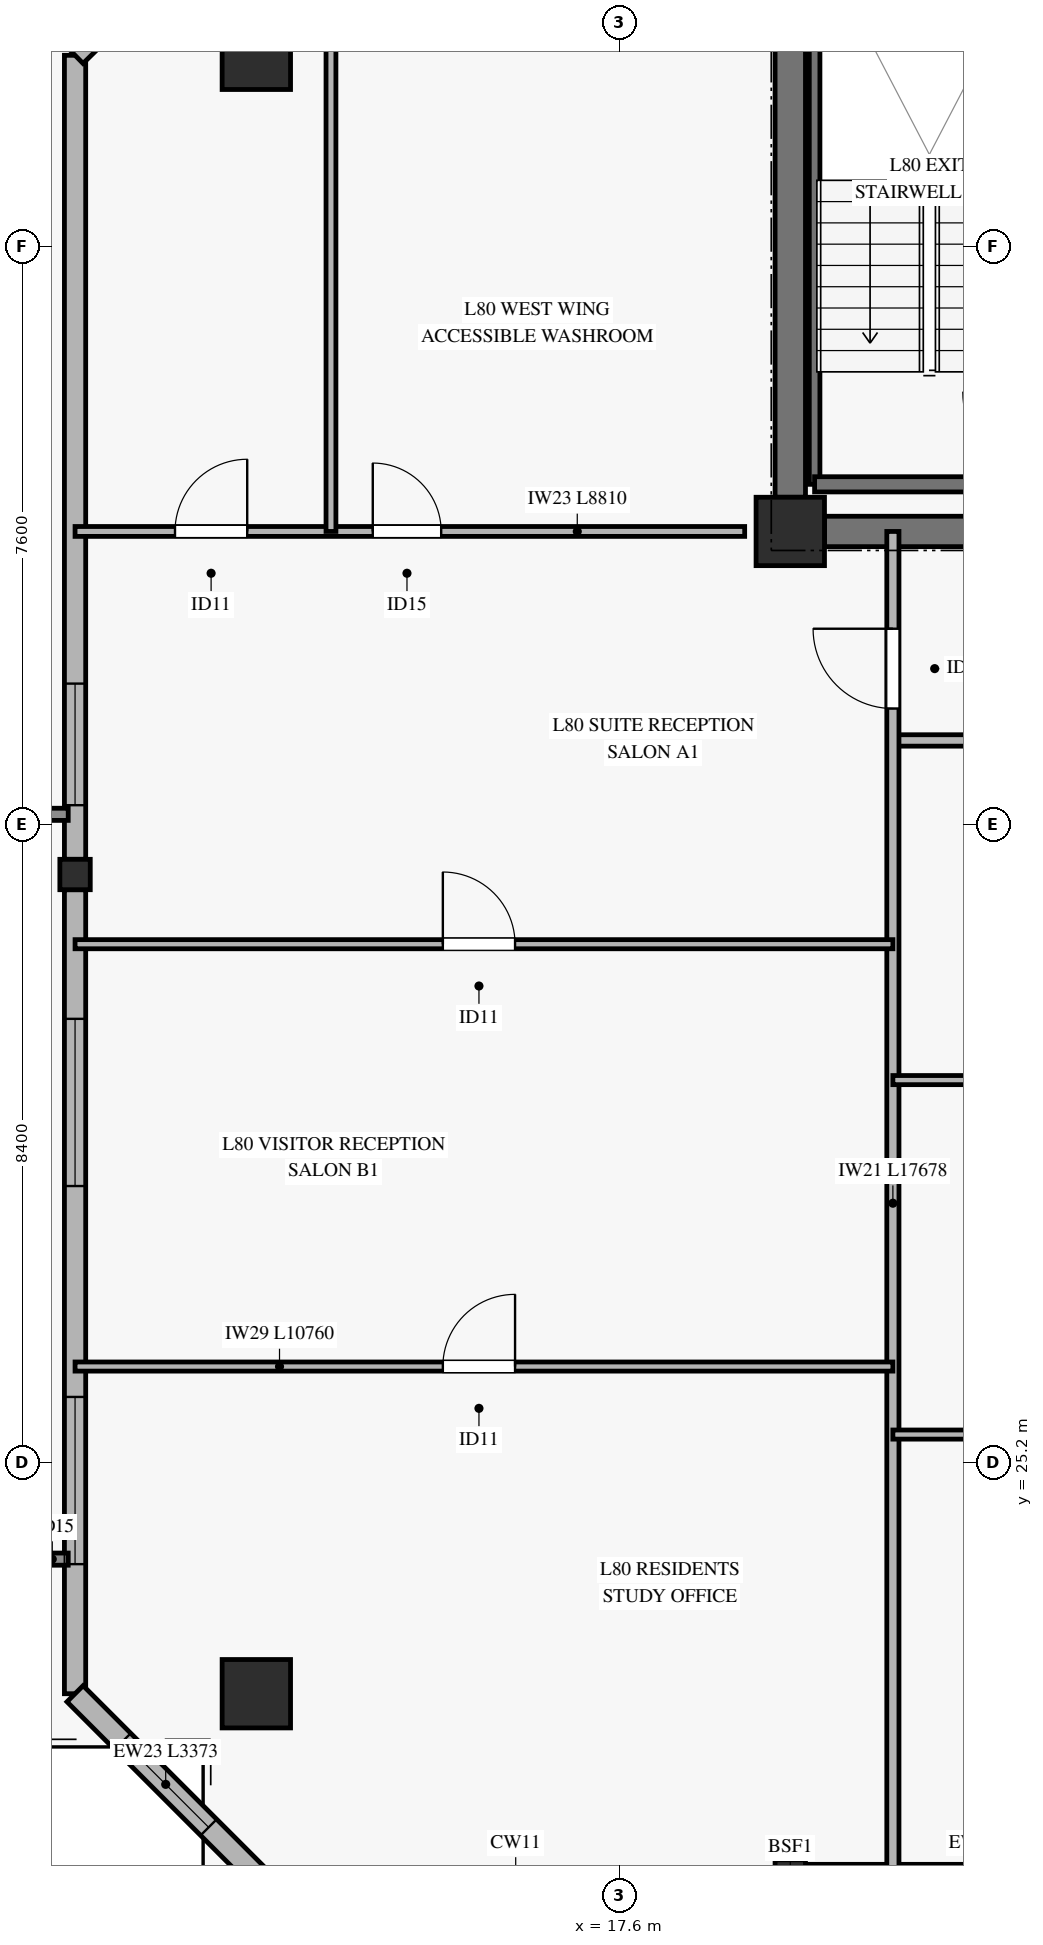
"""IFC4 building model, lengths in metres.
Left out: names, types, materials, properties, quantities, classifications, styles, units other than length and angle.
Written with IfcOpenShell. Run it as: python <this file> out.ifc"""

import sys

from ifc_helpers import new_model, si_unit, direction, frame, frame_2d, origin, origin_2d, place, context, subcontext, project, spatial, rectangle, hollow_rectangle, extrude, source, transform, mapped, element, fill, save


model = new_model("IFC4")
c1 = context("Model", 3, precision=1e-05, world=origin(), true_north=direction((0.0, 1.0)))
c2 = subcontext(c1, "Body", "Model", "MODEL_VIEW")
j1 = project(units=[si_unit("LENGTHUNIT", "METRE"), si_unit("PLANEANGLEUNIT", "RADIAN")], contexts=[c1])
p1 = place(None, origin())
s1 = spatial("IfcSite", under=j1, at=p1, CompositionType="ELEMENT")
p2 = place(p1, origin())
s2 = spatial("IfcBuilding", under=s1, at=p2, CompositionType="ELEMENT")
p3 = place(p2, frame((0.0, 0.0, 310.8)))
s3 = spatial("IfcBuildingStorey", under=s2, at=p3, CompositionType="ELEMENT", Elevation=310.8)
m1 = source(origin(), c2, "Body", "SweptSolid", [
    extrude(rectangle(XDim=0.9, YDim=0.9, at=origin_2d()), origin(), (0.0, 0.0, 1.0), 3.185),
])
p4 = place(p3, frame((19.85, 37.45, 0.0), z_axis=(0.0, 0.0, 1.0), x_axis=(1.0, 0.0, 0.0)))
e1 = element("IfcColumn", 1, at=p4, inside=s3, PredefinedType="PILASTER", context=c2, shape_type="MappedRepresentation", body=[
    mapped(m1, transform((0.0, 0.0, 0.0), x_axis=(1.0, 0.0, 0.0), y_axis=(0.0, 1.0, 0.0), z_axis=(0.0, 0.0, 1.0), scale=1.0)),
])
p5 = place(p3, frame((20.3, 37.45, 0.0), z_axis=(0.0, 0.0, 1.0), x_axis=(1.0, 0.0, 0.0)))
e2 = element("IfcWall", 2, at=p5, inside=s3, PredefinedType="SHEAR", context=c2, shape_type="SweptSolid", body=[
    extrude(rectangle(XDim=10.05, YDim=0.4, at=frame_2d((5.025, 0.0))), origin(), (0.0, 0.0, 1.0), 3.185),
])
p6 = place(p5, frame((4.25, 0.0, 0.0)))
e3 = element("IfcOpeningElement", 3, at=p6, cuts=e2, PredefinedType="OPENING", context=c2, shape_type="SweptSolid", body=[
    extrude(rectangle(XDim=1.2, YDim=2.15, at=frame_2d((0.6, 1.075))), frame((0.0, 0.21, 0.0), z_axis=(0.0, -1.0, 0.0), x_axis=(1.0, 0.0, 0.0)), (0.0, 0.0, 1.0), 0.42),
])
p7 = place(p3, frame((19.85, 37.9, 0.0), z_axis=(0.0, 0.0, 1.0), x_axis=(0.0, 1.0, 0.0)))
e4 = element("IfcWall", 4, at=p7, inside=s3, PredefinedType="SHEAR", context=c2, shape_type="SweptSolid", body=[
    extrude(rectangle(XDim=8.2, YDim=0.4, at=frame_2d((4.1, 0.0))), origin(), (0.0, 0.0, 1.0), 3.185),
])
m2 = source(origin(), c2, "Body", "SweptSolid", [
    extrude(hollow_rectangle(XDim=0.9, YDim=0.9, WallThickness=0.04, at=origin_2d()), origin(), (0.0, 0.0, 1.0), 3.326),
])
p8 = place(p3, frame((12.825, 22.157, 0.0), z_axis=(0.110687193154, 0.266074983542, 0.957576340771), x_axis=(-0.923295305511, 0.384090847093, 0.0)))
e5 = element("IfcColumn", 5, at=p8, inside=s3, PredefinedType="COLUMN", context=c2, shape_type="MappedRepresentation", body=[
    mapped(m2, transform((0.0, 0.0, 0.0), x_axis=(1.0, 0.0, 0.0), y_axis=(0.0, 1.0, 0.0), z_axis=(0.0, 0.0, 1.0), scale=1.0)),
])
m3 = source(origin(), c2, "Body", "SweptSolid", [
    extrude(hollow_rectangle(XDim=0.9, YDim=0.9, WallThickness=0.04, at=origin_2d()), origin(), (0.0, 0.0, 1.0), 3.207),
])
p9 = place(p3, frame((12.825, 43.715, 0.0), z_axis=(0.114814147979, 0.014618246958, 0.993279426083), x_axis=(-0.126301358356, 0.991991918756, 0.0)))
e6 = element("IfcColumn", 6, at=p9, inside=s3, PredefinedType="COLUMN", context=c2, shape_type="MappedRepresentation", body=[
    mapped(m3, transform((0.0, 0.0, 0.0), x_axis=(1.0, 0.0, 0.0), y_axis=(0.0, 1.0, 0.0), z_axis=(0.0, 0.0, 1.0), scale=1.0)),
])
m4 = source(origin(), c2, "Body", "SweptSolid", [
    extrude(hollow_rectangle(XDim=0.4, YDim=0.4, WallThickness=0.02, at=origin_2d()), origin(), (0.0, 0.0, 1.0), 3.319),
])
p10 = place(p3, frame((19.85, 19.772, 0.0), z_axis=(0.0, 0.280875615119, 0.959744178847), x_axis=(-1.0, 0.0, 0.0)))
e7 = element("IfcColumn", 7, at=p10, inside=s3, PredefinedType="COLUMN", context=c2, shape_type="MappedRepresentation", body=[
    mapped(m4, transform((0.0, 0.0, 0.0), x_axis=(1.0, 0.0, 0.0), y_axis=(0.0, 1.0, 0.0), z_axis=(0.0, 0.0, 1.0), scale=1.0)),
])
m5 = source(origin(), c2, "Body", "SweptSolid", [
    extrude(hollow_rectangle(XDim=0.4, YDim=0.4, WallThickness=0.02, at=origin_2d()), origin(), (0.0, 0.0, 1.0), 3.246),
])
p11 = place(p3, frame((10.44, 32.936, 0.0), z_axis=(0.127876528395, 0.143597819239, 0.981339523201), x_axis=(-0.746804669772, 0.665043446104, 0.0)))
e8 = element("IfcColumn", 8, at=p11, inside=s3, PredefinedType="COLUMN", context=c2, shape_type="MappedRepresentation", body=[
    mapped(m5, transform((0.0, 0.0, 0.0), x_axis=(1.0, 0.0, 0.0), y_axis=(0.0, 1.0, 0.0), z_axis=(0.0, 0.0, 1.0), scale=1.0)),
])
p12 = place(p3, frame((20.05, 19.772, 0.0), z_axis=(0.0, 0.0, 1.0), x_axis=(1.0, 0.0, 0.0)))
e9 = element("IfcWall", 9, at=p12, inside=s3, PredefinedType="SOLIDWALL", context=c2, shape_type="SweptSolid", body=[
    extrude(rectangle(XDim=10.55, YDim=0.28, at=frame_2d((5.275, 0.0))), origin(), (0.0, 0.0, 1.0), 2.815),
])
p13 = place(p12, frame((4.35, 0.0, 0.0)))
e10 = element("IfcOpeningElement", 10, at=p13, cuts=e9, PredefinedType="OPENING", context=c2, shape_type="SweptSolid", body=[
    extrude(rectangle(XDim=1.8, YDim=2.25, at=frame_2d((0.9, 1.125))), frame((0.0, 0.15, 0.0), z_axis=(0.0, -1.0, 0.0), x_axis=(1.0, 0.0, 0.0)), (0.0, 0.0, 1.0), 0.3),
])
p14 = place(p12, frame((1.57, 0.0, 0.45)))
e11 = element("IfcOpeningElement", 11, at=p14, cuts=e9, PredefinedType="OPENING", context=c2, shape_type="SweptSolid", body=[
    extrude(rectangle(XDim=2.2, YDim=2.1, at=frame_2d((1.1, 1.05))), frame((0.0, 0.15, 0.0), z_axis=(0.0, -1.0, 0.0), x_axis=(1.0, 0.0, 0.0)), (0.0, 0.0, 1.0), 0.3),
])
p15 = place(p12, frame((7.35, 0.0, 0.45)))
e12 = element("IfcOpeningElement", 12, at=p15, cuts=e9, PredefinedType="OPENING", context=c2, shape_type="SweptSolid", body=[
    extrude(rectangle(XDim=1.6, YDim=2.0, at=frame_2d((0.8, 1.0))), frame((0.0, 0.15, 0.0), z_axis=(0.0, -1.0, 0.0), x_axis=(1.0, 0.0, 0.0)), (0.0, 0.0, 1.0), 0.3),
])
p16 = place(p3, frame((10.44, 22.157, 0.0), z_axis=(0.0, 0.0, 1.0), x_axis=(0.0, 1.0, 0.0)))
e13 = element("IfcWall", 13, at=p16, inside=s3, PredefinedType="SOLIDWALL", context=c2, shape_type="SweptSolid", body=[
    extrude(rectangle(XDim=10.579, YDim=0.28, at=frame_2d((5.29, 0.0))), origin(), (0.0, 0.0, 1.0), 2.815),
])
p17 = place(p16, frame((1.705, 0.0, 0.45)))
e14 = element("IfcOpeningElement", 14, at=p17, cuts=e13, PredefinedType="OPENING", context=c2, shape_type="SweptSolid", body=[
    extrude(rectangle(XDim=2.2, YDim=2.1, at=frame_2d((1.1, 1.05))), frame((0.0, 0.15, 0.0), z_axis=(0.0, -1.0, 0.0), x_axis=(1.0, 0.0, 0.0)), (0.0, 0.0, 1.0), 0.3),
])
p18 = place(p16, frame((6.68, 0.0, 0.45)))
e15 = element("IfcOpeningElement", 15, at=p18, cuts=e13, PredefinedType="OPENING", context=c2, shape_type="SweptSolid", body=[
    extrude(rectangle(XDim=2.2, YDim=2.1, at=frame_2d((1.1, 1.05))), frame((0.0, 0.15, 0.0), z_axis=(0.0, -1.0, 0.0), x_axis=(1.0, 0.0, 0.0)), (0.0, 0.0, 1.0), 0.3),
])
p19 = place(p3, frame((10.44, 33.136, 0.0), z_axis=(0.0, 0.0, 1.0), x_axis=(0.0, 1.0, 0.0)))
e16 = element("IfcWall", 16, at=p19, inside=s3, PredefinedType="SOLIDWALL", context=c2, shape_type="SweptSolid", body=[
    extrude(rectangle(XDim=10.579, YDim=0.28, at=frame_2d((5.29, 0.0))), origin(), (0.0, 0.0, 1.0), 2.815),
])
p20 = place(p19, frame((0.712, 0.0, 0.45)))
e17 = element("IfcOpeningElement", 17, at=p20, cuts=e16, PredefinedType="OPENING", context=c2, shape_type="SweptSolid", body=[
    extrude(rectangle(XDim=1.6, YDim=2.0, at=frame_2d((0.8, 1.0))), frame((0.0, 0.15, 0.0), z_axis=(0.0, -1.0, 0.0), x_axis=(1.0, 0.0, 0.0)), (0.0, 0.0, 1.0), 0.3),
])
p21 = place(p3, frame((10.44, 22.157, 0.0), z_axis=(0.0, 0.0, 1.0), x_axis=(0.707106781187, -0.707106781187, 0.0)))
e18 = element("IfcWall", 18, at=p21, inside=s3, PredefinedType="SOLIDWALL", context=c2, shape_type="SweptSolid", body=[
    extrude(rectangle(XDim=3.373, YDim=0.3, at=frame_2d((1.687, 0.0))), origin(), (0.0, 0.0, 1.0), 2.815),
])
p22 = place(p21, frame((0.886, 0.0, 0.45)))
e19 = element("IfcOpeningElement", 19, at=p22, cuts=e18, PredefinedType="OPENING", context=c2, shape_type="SweptSolid", body=[
    extrude(rectangle(XDim=1.6, YDim=2.0, at=frame_2d((0.8, 1.0))), frame((0.0, 0.16, 0.0), z_axis=(0.0, -1.0, 0.0), x_axis=(1.0, 0.0, 0.0)), (0.0, 0.0, 1.0), 0.32),
])
p23 = place(p3, frame((13.025, 46.25, 0.0), z_axis=(0.0, 0.0, 1.0), x_axis=(-0.713984922877, -0.700161074257, 0.0)))
e20 = element("IfcWall", 20, at=p23, inside=s3, PredefinedType="SOLIDWALL", context=c2, shape_type="SweptSolid", body=[
    extrude(rectangle(XDim=3.62, YDim=0.3, at=frame_2d((1.81, 0.0))), origin(), (0.0, 0.0, 1.0), 2.815),
])
p24 = place(p23, frame((1.01, 0.0, 0.45)))
e21 = element("IfcOpeningElement", 21, at=p24, cuts=e20, PredefinedType="OPENING", context=c2, shape_type="SweptSolid", body=[
    extrude(rectangle(XDim=1.6, YDim=2.0, at=frame_2d((0.8, 1.0))), frame((0.0, 0.16, 0.0), z_axis=(0.0, -1.0, 0.0), x_axis=(1.0, 0.0, 0.0)), (0.0, 0.0, 1.0), 0.32),
])
p25 = place(p3, frame((20.17, 38.07, 0.0), z_axis=(0.0, 0.0, 1.0), x_axis=(0.0, 1.0, 0.0)))
e22 = element("IfcWall", 22, at=p25, inside=s3, PredefinedType="SOLIDWALL", context=c2, shape_type="SweptSolid", body=[
    extrude(rectangle(XDim=7.25, YDim=0.14, at=frame_2d((3.625, 0.0))), origin(), (0.0, 0.0, 1.0), 3.4),
])
p26 = place(p3, frame((20.17, 38.07, 0.0), z_axis=(0.0, 0.0, 1.0), x_axis=(1.0, 0.0, 0.0)))
e23 = element("IfcWall", 23, at=p26, inside=s3, PredefinedType="SOLIDWALL", context=c2, shape_type="SweptSolid", body=[
    extrude(rectangle(XDim=3.05, YDim=0.2, at=frame_2d((1.525, 0.0))), origin(), (0.0, 0.0, 1.0), 3.4),
])
p27 = place(p3, frame((21.2, 34.7, 0.0), z_axis=(0.0, 0.0, 1.0), x_axis=(1.0, 0.0, 0.0)))
e24 = element("IfcWall", 24, at=p27, inside=s3, PredefinedType="PARTITIONING", context=c2, shape_type="SweptSolid", body=[
    extrude(rectangle(XDim=23.1, YDim=0.15, at=frame_2d((11.55, 0.0))), origin(), (0.0, 0.0, 1.0), 2.47),
])
p28 = place(p27, frame((5.185, 0.0, 0.0)))
e25 = element("IfcOpeningElement", 25, at=p28, cuts=e24, PredefinedType="OPENING", context=c2, shape_type="SweptSolid", body=[
    extrude(rectangle(XDim=1.05, YDim=2.15, at=frame_2d((0.525, 1.075))), frame((0.0, 0.085, 0.0), z_axis=(0.0, -1.0, 0.0), x_axis=(1.0, 0.0, 0.0)), (0.0, 0.0, 1.0), 0.17),
])
p29 = place(p27, frame((17.131, 0.0, 0.0)))
e26 = element("IfcOpeningElement", 26, at=p29, cuts=e24, PredefinedType="OPENING", context=c2, shape_type="SweptSolid", body=[
    extrude(rectangle(XDim=1.05, YDim=2.15, at=frame_2d((0.525, 1.075))), frame((0.0, 0.085, 0.0), z_axis=(0.0, -1.0, 0.0), x_axis=(1.0, 0.0, 0.0)), (0.0, 0.0, 1.0), 0.17),
])
p30 = place(p3, frame((21.2, 19.772, 0.0), z_axis=(0.0, 0.0, 1.0), x_axis=(0.0, 1.0, 0.0)))
e27 = element("IfcWall", 27, at=p30, inside=s3, PredefinedType="PARTITIONING", context=c2, shape_type="SweptSolid", body=[
    extrude(rectangle(XDim=17.678, YDim=0.16, at=frame_2d((8.839, 0.0))), origin(), (0.0, 0.0, 1.0), 2.77),
])
p31 = place(p30, frame((15.348, 0.0, 0.0)))
e28 = element("IfcOpeningElement", 28, at=p31, cuts=e27, PredefinedType="OPENING", context=c2, shape_type="SweptSolid", body=[
    extrude(rectangle(XDim=1.05, YDim=2.15, at=frame_2d((0.525, 1.075))), frame((0.0, 0.09, 0.0), z_axis=(0.0, -1.0, 0.0), x_axis=(1.0, 0.0, 0.0)), (0.0, 0.0, 1.0), 0.18),
])
p32 = place(p3, frame((10.44, 26.462, 0.0), z_axis=(0.0, 0.0, 1.0), x_axis=(1.0, 0.0, 0.0)))
e29 = element("IfcWall", 29, at=p32, inside=s3, PredefinedType="PARTITIONING", context=c2, shape_type="SweptSolid", body=[
    extrude(rectangle(XDim=10.76, YDim=0.12, at=frame_2d((5.38, 0.0))), origin(), (0.0, 0.0, 1.0), 2.47),
])
p33 = place(p32, frame((4.839, 0.0, 0.0)))
e30 = element("IfcOpeningElement", 30, at=p33, cuts=e29, PredefinedType="OPENING", context=c2, shape_type="SweptSolid", body=[
    extrude(rectangle(XDim=0.95, YDim=2.1, at=frame_2d((0.475, 1.05))), frame((0.0, 0.07, 0.0), z_axis=(0.0, -1.0, 0.0), x_axis=(1.0, 0.0, 0.0)), (0.0, 0.0, 1.0), 0.14),
])
p34 = place(p3, frame((10.44, 32.019, 0.0), z_axis=(0.0, 0.0, 1.0), x_axis=(1.0, 0.0, 0.0)))
e31 = element("IfcWall", 31, at=p34, inside=s3, PredefinedType="PARTITIONING", context=c2, shape_type="SweptSolid", body=[
    extrude(rectangle(XDim=10.76, YDim=0.12, at=frame_2d((5.38, 0.0))), origin(), (0.0, 0.0, 1.0), 2.47),
])
p35 = place(p34, frame((4.839, 0.0, 0.0)))
e32 = element("IfcOpeningElement", 32, at=p35, cuts=e31, PredefinedType="OPENING", context=c2, shape_type="SweptSolid", body=[
    extrude(rectangle(XDim=0.95, YDim=2.1, at=frame_2d((0.475, 1.05))), frame((0.0, 0.07, 0.0), z_axis=(0.0, -1.0, 0.0), x_axis=(1.0, 0.0, 0.0)), (0.0, 0.0, 1.0), 0.14),
])
p36 = place(p3, frame((21.2, 25.567, 0.0), z_axis=(0.0, 0.0, 1.0), x_axis=(1.0, 0.0, 0.0)))
e33 = element("IfcWall", 33, at=p36, inside=s3, PredefinedType="PARTITIONING", context=c2, shape_type="SweptSolid", body=[
    extrude(rectangle(XDim=13.2, YDim=0.12, at=frame_2d((6.6, 0.0))), origin(), (0.0, 0.0, 1.0), 2.47),
])
p37 = place(p36, frame((5.446, 0.0, 0.0)))
e34 = element("IfcOpeningElement", 34, at=p37, cuts=e33, PredefinedType="OPENING", context=c2, shape_type="SweptSolid", body=[
    extrude(rectangle(XDim=0.95, YDim=2.1, at=frame_2d((0.475, 1.05))), frame((0.0, 0.07, 0.0), z_axis=(0.0, -1.0, 0.0), x_axis=(1.0, 0.0, 0.0)), (0.0, 0.0, 1.0), 0.14),
])
p38 = place(p3, frame((21.2, 30.231, 0.0), z_axis=(0.0, 0.0, 1.0), x_axis=(1.0, 0.0, 0.0)))
e35 = element("IfcWall", 35, at=p38, inside=s3, PredefinedType="PARTITIONING", context=c2, shape_type="SweptSolid", body=[
    extrude(rectangle(XDim=13.2, YDim=0.12, at=frame_2d((6.6, 0.0))), origin(), (0.0, 0.0, 1.0), 2.47),
])
p39 = place(p38, frame((5.446, 0.0, 0.0)))
e36 = element("IfcOpeningElement", 36, at=p39, cuts=e35, PredefinedType="OPENING", context=c2, shape_type="SweptSolid", body=[
    extrude(rectangle(XDim=0.95, YDim=2.1, at=frame_2d((0.475, 1.05))), frame((0.0, 0.07, 0.0), z_axis=(0.0, -1.0, 0.0), x_axis=(1.0, 0.0, 0.0)), (0.0, 0.0, 1.0), 0.14),
])
p40 = place(p3, frame((10.44, 37.45, 0.0), z_axis=(0.0, 0.0, 1.0), x_axis=(1.0, 0.0, 0.0)))
e37 = element("IfcWall", 37, at=p40, inside=s3, PredefinedType="PARTITIONING", context=c2, shape_type="SweptSolid", body=[
    extrude(rectangle(XDim=8.81, YDim=0.13, at=frame_2d((4.405, 0.0))), origin(), (0.0, 0.0, 1.0), 2.82),
])
p41 = place(p40, frame((1.315, 0.0, 0.0)))
e38 = element("IfcOpeningElement", 38, at=p41, cuts=e37, PredefinedType="OPENING", context=c2, shape_type="SweptSolid", body=[
    extrude(rectangle(XDim=0.95, YDim=2.1, at=frame_2d((0.475, 1.05))), frame((0.0, 0.075, 0.0), z_axis=(0.0, -1.0, 0.0), x_axis=(1.0, 0.0, 0.0)), (0.0, 0.0, 1.0), 0.15),
])
p42 = place(p40, frame((3.917, 0.0, 0.0)))
e39 = element("IfcOpeningElement", 39, at=p42, cuts=e37, PredefinedType="OPENING", context=c2, shape_type="SweptSolid", body=[
    extrude(rectangle(XDim=0.9, YDim=2.1, at=frame_2d((0.45, 1.05))), frame((0.0, 0.075, 0.0), z_axis=(0.0, -1.0, 0.0), x_axis=(1.0, 0.0, 0.0)), (0.0, 0.0, 1.0), 0.15),
])
p43 = place(p3, frame((13.807, 37.45, 0.0), z_axis=(0.0, 0.0, 1.0), x_axis=(0.0, 1.0, 0.0)))
e40 = element("IfcWall", 40, at=p43, inside=s3, PredefinedType="PARTITIONING", context=c2, shape_type="SweptSolid", body=[
    extrude(rectangle(XDim=8.8, YDim=0.13, at=frame_2d((4.4, 0.0))), origin(), (0.0, 0.0, 1.0), 3.185),
])
m6 = source(origin(), c2, "Body", "SweptSolid", [
    extrude(rectangle(XDim=2.2, YDim=2.1, at=frame_2d((1.1, 1.05))), frame((0.0, 0.03, 0.0), z_axis=(0.0, -1.0, 0.0), x_axis=(1.0, 0.0, 0.0)), (0.0, 0.0, 1.0), 0.06),
])
p44 = place(p17, origin())
e41 = element("IfcWindow", 41, at=p44, inside=s3, PartitioningType="SINGLE_PANEL", PredefinedType="WINDOW", context=c2, shape_type="MappedRepresentation", body=[
    mapped(m6, transform((0.0, 0.0, 0.0), x_axis=(1.0, 0.0, 0.0), y_axis=(0.0, 1.0, 0.0), z_axis=(0.0, 0.0, 1.0), scale=1.0)),
])
fill(e14, e41)
p45 = place(p18, origin())
e42 = element("IfcWindow", 42, at=p45, inside=s3, PartitioningType="SINGLE_PANEL", PredefinedType="WINDOW", context=c2, shape_type="MappedRepresentation", body=[
    mapped(m6, transform((0.0, 0.0, 0.0), x_axis=(1.0, 0.0, 0.0), y_axis=(0.0, 1.0, 0.0), z_axis=(0.0, 0.0, 1.0), scale=1.0)),
])
fill(e15, e42)
m7 = source(origin(), c2, "Body", "SweptSolid", [
    extrude(rectangle(XDim=1.6, YDim=2.0, at=frame_2d((0.8, 1.0))), frame((0.0, 0.03, 0.0), z_axis=(0.0, -1.0, 0.0), x_axis=(1.0, 0.0, 0.0)), (0.0, 0.0, 1.0), 0.06),
])
p46 = place(p20, origin())
e43 = element("IfcWindow", 43, at=p46, inside=s3, PartitioningType="SINGLE_PANEL", PredefinedType="WINDOW", context=c2, shape_type="MappedRepresentation", body=[
    mapped(m7, transform((0.0, 0.0, 0.0), x_axis=(1.0, 0.0, 0.0), y_axis=(0.0, 1.0, 0.0), z_axis=(0.0, 0.0, 1.0), scale=1.0)),
])
fill(e17, e43)
p47 = place(p22, origin())
e44 = element("IfcWindow", 44, at=p47, inside=s3, PartitioningType="SINGLE_PANEL", PredefinedType="WINDOW", context=c2, shape_type="MappedRepresentation", body=[
    mapped(m7, transform((0.0, 0.0, 0.0), x_axis=(1.0, 0.0, 0.0), y_axis=(0.0, 1.0, 0.0), z_axis=(0.0, 0.0, 1.0), scale=1.0)),
])
fill(e19, e44)
m8 = source(origin(), c2, "Body", "SweptSolid", [
    extrude(rectangle(XDim=1.05, YDim=2.15, at=frame_2d((0.525, 1.075))), frame((0.0, 0.025, 0.0), z_axis=(0.0, -1.0, 0.0), x_axis=(1.0, 0.0, 0.0)), (0.0, 0.0, 1.0), 0.05),
])
p48 = place(p31, origin())
e45 = element("IfcDoor", 45, at=p48, inside=s3, OperationType="SINGLE_SWING_RIGHT", PredefinedType="DOOR", context=c2, shape_type="MappedRepresentation", body=[
    mapped(m8, transform((0.0, 0.0, 0.0), x_axis=(1.0, 0.0, 0.0), y_axis=(0.0, 1.0, 0.0), z_axis=(0.0, 0.0, 1.0), scale=1.0)),
])
fill(e28, e45)
m9 = source(origin(), c2, "Body", "SweptSolid", [
    extrude(rectangle(XDim=0.95, YDim=2.1, at=frame_2d((0.475, 1.05))), frame((0.0, 0.025, 0.0), z_axis=(0.0, -1.0, 0.0), x_axis=(1.0, 0.0, 0.0)), (0.0, 0.0, 1.0), 0.05),
])
p49 = place(p35, origin())
e46 = element("IfcDoor", 46, at=p49, inside=s3, OperationType="SINGLE_SWING_LEFT", PredefinedType="DOOR", context=c2, shape_type="MappedRepresentation", body=[
    mapped(m9, transform((0.0, 0.0, 0.0), x_axis=(1.0, 0.0, 0.0), y_axis=(0.0, 1.0, 0.0), z_axis=(0.0, 0.0, 1.0), scale=1.0)),
])
fill(e32, e46)
p50 = place(p33, origin())
e47 = element("IfcDoor", 47, at=p50, inside=s3, OperationType="SINGLE_SWING_RIGHT", PredefinedType="DOOR", context=c2, shape_type="MappedRepresentation", body=[
    mapped(m9, transform((0.0, 0.0, 0.0), x_axis=(1.0, 0.0, 0.0), y_axis=(0.0, 1.0, 0.0), z_axis=(0.0, 0.0, 1.0), scale=1.0)),
])
fill(e30, e47)
p51 = place(p41, origin())
e48 = element("IfcDoor", 48, at=p51, inside=s3, OperationType="SINGLE_SWING_RIGHT", PredefinedType="DOOR", context=c2, shape_type="MappedRepresentation", body=[
    mapped(m9, transform((0.0, 0.0, 0.0), x_axis=(1.0, 0.0, 0.0), y_axis=(0.0, 1.0, 0.0), z_axis=(0.0, 0.0, 1.0), scale=1.0)),
])
fill(e38, e48)
m10 = source(origin(), c2, "Body", "SweptSolid", [
    extrude(rectangle(XDim=0.9, YDim=2.1, at=frame_2d((0.45, 1.05))), frame((0.0, 0.025, 0.0), z_axis=(0.0, -1.0, 0.0), x_axis=(1.0, 0.0, 0.0)), (0.0, 0.0, 1.0), 0.05),
])
p52 = place(p42, origin())
e49 = element("IfcDoor", 49, at=p52, inside=s3, OperationType="SINGLE_SWING_LEFT", PredefinedType="DOOR", context=c2, shape_type="MappedRepresentation", body=[
    mapped(m10, transform((0.0, 0.0, 0.0), x_axis=(1.0, 0.0, 0.0), y_axis=(0.0, 1.0, 0.0), z_axis=(0.0, 0.0, 1.0), scale=1.0)),
])
fill(e39, e49)
save(model, sys.argv[1])
